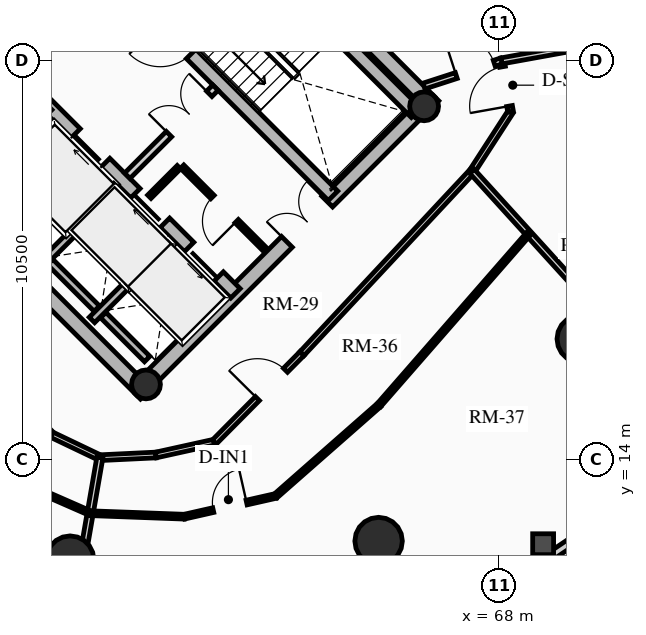
"""IFC4 building model, lengths in metres.
Left out: names, types, materials, properties, quantities, classifications, styles, units other than length and angle.
Written with IfcOpenShell. Run it as: python <this file> out.ifc"""

import sys

from ifc_helpers import new_model, si_unit, direction, frame, frame_2d, origin, origin_2d, place, context, subcontext, project, spatial, rectangle, circle, hollow_circle, extrude, source, transform, mapped, element, fill, save


model = new_model("IFC4")
c1 = context("Model", 3, precision=1e-05, world=origin(), true_north=direction((0.0, 1.0)))
c2 = subcontext(c1, "Body", "Model", "MODEL_VIEW")
j1 = project(units=[si_unit("LENGTHUNIT", "METRE"), si_unit("PLANEANGLEUNIT", "RADIAN")], contexts=[c1])
p1 = place(None, origin())
s1 = spatial("IfcSite", under=j1, at=p1, CompositionType="ELEMENT")
p2 = place(p1, origin())
s2 = spatial("IfcBuilding", under=s1, at=p2, CompositionType="ELEMENT")
p3 = place(p2, frame((0.0, 0.0, 166.15)))
s3 = spatial("IfcBuildingStorey", under=s2, at=p3, CompositionType="ELEMENT", Elevation=166.15)
for number, where, z_axis, x_axis in (
    (1, (58.702, 15.732, 0.0), (0.0, 0.0, 1.0), (-0.707, 0.707, 0.0)),
    (2, (66.268, 23.298, 0.0), (0.0, 0.0, 1.0), (-0.707, 0.707, 0.0)),
):
    element("IfcWall", number, at=place(p3, frame(where, z_axis=z_axis, x_axis=x_axis)), inside=s3, PredefinedType="SHEAR", context=c2, shape_type="SweptSolid", body=[
        extrude(rectangle(XDim=14.1, YDim=0.4, at=frame_2d((7.05, 0.0))), origin(), (0.0, 0.0, 1.0), 2.91),
    ])
p4 = place(p3, frame((58.561, 15.873, 0.0), z_axis=(0.0, 0.0, 1.0), x_axis=(0.707106781187, 0.707106781187, 0.0)))
e3 = element("IfcWall", 3, at=p4, inside=s3, PredefinedType="SHEAR", context=c2, shape_type="SweptSolid", body=[
    extrude(rectangle(XDim=10.7, YDim=0.4, at=frame_2d((5.35, 0.0))), origin(), (0.0, 0.0, 1.0), 2.91),
])
m1 = source(origin(), c2, "Body", "SweptSolid", [
    extrude(rectangle(XDim=1.5, YDim=2.02, at=frame_2d((0.75, 1.01))), frame((0.0, 0.21, 0.0), z_axis=(0.0, -1.0, 0.0), x_axis=(1.0, 0.0, 0.0)), (0.0, 0.0, 1.0), 0.42),
])
p5 = place(p4, frame((5.45, 0.0, 0.0)))
e4 = element("IfcOpeningElement", 4, at=p5, cuts=e3, PredefinedType="OPENING", context=c2, shape_type="MappedRepresentation", body=[
    mapped(m1, transform((0.0, 0.0, 0.0), x_axis=(1.0, 0.0, 0.0), y_axis=(0.0, 1.0, 0.0), z_axis=(0.0, 0.0, 1.0), scale=1.0)),
])
p6 = place(p3, frame((61.06, 18.373, 0.0), z_axis=(0.0, 0.0, 1.0), x_axis=(-0.707106781187, 0.707106781187, 0.0)))
e5 = element("IfcWall", 5, at=p6, inside=s3, PredefinedType="SHEAR", context=c2, shape_type="SweptSolid", body=[
    extrude(rectangle(XDim=13.7, YDim=0.35, at=frame_2d((6.85, 0.0))), origin(), (0.0, 0.0, 1.0), 2.91),
])
m2 = source(origin(), c2, "Body", "SweptSolid", [
    extrude(rectangle(XDim=1.1, YDim=2.015, at=frame_2d((0.55, 1.007))), frame((0.0, 0.185, 0.0), z_axis=(0.0, -1.0, 0.0), x_axis=(1.0, 0.0, 0.0)), (0.0, 0.0, 1.0), 0.37),
])
p7 = place(p6, frame((4.85, 0.0, 0.0)))
e6 = element("IfcOpeningElement", 6, at=p7, cuts=e5, PredefinedType="OPENING", context=c2, shape_type="MappedRepresentation", body=[
    mapped(m2, transform((0.0, 0.0, 0.0), x_axis=(1.0, 0.0, 0.0), y_axis=(0.0, 1.0, 0.0), z_axis=(0.0, 0.0, 1.0), scale=1.0)),
])
p8 = place(p6, frame((0.625, 0.0, 0.0)))
e7 = element("IfcOpeningElement", 7, at=p8, cuts=e5, PredefinedType="OPENING", context=c2, shape_type="MappedRepresentation", body=[
    mapped(m2, transform((0.0, 0.0, 0.0), x_axis=(1.0, 0.0, 0.0), y_axis=(0.0, 1.0, 0.0), z_axis=(0.0, 0.0, 1.0), scale=1.0)),
])
p9 = place(p6, frame((2.625, 0.0, 0.0)))
e8 = element("IfcOpeningElement", 8, at=p9, cuts=e5, PredefinedType="OPENING", context=c2, shape_type="MappedRepresentation", body=[
    mapped(m2, transform((0.0, 0.0, 0.0), x_axis=(1.0, 0.0, 0.0), y_axis=(0.0, 1.0, 0.0), z_axis=(0.0, 0.0, 1.0), scale=1.0)),
])
m3 = source(origin(), c2, "Body", "SweptSolid", [
    extrude(rectangle(XDim=1.15, YDim=2.02, at=frame_2d((0.575, 1.01))), frame((0.0, 0.185, 0.0), z_axis=(0.0, -1.0, 0.0), x_axis=(1.0, 0.0, 0.0)), (0.0, 0.0, 1.0), 0.37),
])
p10 = place(p6, frame((7.27, 0.0, 0.0)))
e9 = element("IfcOpeningElement", 9, at=p10, cuts=e5, PredefinedType="OPENING", context=c2, shape_type="MappedRepresentation", body=[
    mapped(m3, transform((0.0, 0.0, 0.0), x_axis=(1.0, 0.0, 0.0), y_axis=(0.0, 1.0, 0.0), z_axis=(0.0, 0.0, 1.0), scale=1.0)),
])
p11 = place(p3, frame((63.627, 20.94, 0.0), z_axis=(0.0, 0.0, 1.0), x_axis=(-0.707119496762, 0.707094065383, 0.0)))
e10 = element("IfcWall", 10, at=p11, inside=s3, PredefinedType="SHEAR", context=c2, shape_type="SweptSolid", body=[
    extrude(rectangle(XDim=9.6, YDim=0.35, at=frame_2d((4.8, 0.0))), origin(), (0.0, 0.0, 1.0), 2.91),
])
p12 = place(p11, frame((5.28, 0.0, 0.0)))
e11 = element("IfcOpeningElement", 11, at=p12, cuts=e10, PredefinedType="OPENING", context=c2, shape_type="MappedRepresentation", body=[
    mapped(m3, transform((0.0, 0.0, 0.0), x_axis=(1.0, 0.0, 0.0), y_axis=(0.0, 1.0, 0.0), z_axis=(0.0, 0.0, 1.0), scale=1.0)),
])
p13 = place(p3, frame((65.812, 23.125, 0.0), z_axis=(0.0, 0.0, 1.0), x_axis=(-0.707106781187, 0.707106781187, 0.0)))
e12 = element("IfcWall", 12, at=p13, inside=s3, PredefinedType="SHEAR", context=c2, shape_type="SweptSolid", body=[
    extrude(rectangle(XDim=6.695, YDim=0.35, at=frame_2d((3.348, 0.0))), origin(), (0.0, 0.0, 1.0), 2.91),
])
for number, where, z_axis, x_axis in (
    (13, (58.706, 15.976, 0.0), (0.0, 0.0, 1.0), (0.707, 0.707, 0.0)),
    (14, (66.024, 23.294, 0.0), (0.0, 0.0, 1.0), (0.707, 0.707, 0.0)),
):
    element("IfcColumn", number, at=place(p3, frame(where, z_axis=z_axis, x_axis=x_axis)), inside=s3, PredefinedType="COLUMN", context=c2, shape_type="SweptSolid", body=[
        extrude(hollow_circle(Radius=0.38, WallThickness=0.032, at=origin_2d()), origin(), (0.0, 0.0, 1.0), 2.91),
    ])
for number, where, z_axis, x_axis in (
    (15, (56.709, 11.365, 0.0), (0.0, 0.0, 1.0), (1.0, 0.0, 0.0)),
    (16, (64.827, 11.854, 0.0), (0.0, 0.0, 1.0), (1.0, 0.0, 0.0)),
    (17, (70.146, 17.173, 0.0), (0.0, 0.0, 1.0), (1.0, 0.0, 0.0)),
):
    element("IfcColumn", number, at=place(p3, frame(where, z_axis=z_axis, x_axis=x_axis)), inside=s3, PredefinedType="USERDEFINED", context=c2, shape_type="SweptSolid", body=[
        extrude(circle(Radius=0.625, at=origin_2d()), origin(), (0.0, 0.0, 1.0), 2.91),
    ])
p14 = place(p3, frame((70.065, 11.935, 0.0), z_axis=(0.0, 0.0, 1.0), x_axis=(-0.828739009952, -0.559635286042, 0.0)))
e18 = element("IfcWall", 18, at=p14, inside=s3, PredefinedType="SOLIDWALL", context=c2, shape_type="SweptSolid", body=[
    extrude(rectangle(XDim=4.569, YDim=0.22, at=frame_2d((2.284, 0.0))), origin(), (0.0, 0.0, 1.0), 2.675),
])
p15 = place(p3, frame((55.888, 19.069, 0.0), z_axis=(0.0, 0.0, 1.0), x_axis=(0.707106781187, 0.707106781187, 0.0)))
e19 = element("IfcWall", 19, at=p15, inside=s3, PredefinedType="SHEAR", context=c2, shape_type="SweptSolid", body=[
    extrude(rectangle(XDim=2.97, YDim=0.2, at=frame_2d((1.485, 0.0))), origin(), (0.0, 0.0, 1.0), 2.91),
])
p16 = place(p3, frame((57.284, 17.673, 0.0), z_axis=(0.0, 0.0, 1.0), x_axis=(0.707147878904, 0.70706568108, 0.0)))
e20 = element("IfcWall", 20, at=p16, inside=s3, PredefinedType="SHEAR", context=c2, shape_type="SweptSolid", body=[
    extrude(rectangle(XDim=2.97, YDim=0.2, at=frame_2d((1.485, 0.0))), origin(), (0.0, 0.0, 1.0), 2.91),
])
p17 = place(p3, frame((57.412, 17.97, 0.0), z_axis=(0.0, 0.0, 1.0), x_axis=(-0.707106781187, 0.707106781187, 0.0)))
e21 = element("IfcWall", 21, at=p17, inside=s3, PredefinedType="SHEAR", context=c2, shape_type="SweptSolid", body=[
    extrude(rectangle(XDim=1.735, YDim=0.2, at=frame_2d((0.867, 0.0))), origin(), (0.0, 0.0, 1.0), 2.91),
])
p18 = place(p3, frame((58.737, 16.644, 0.0), z_axis=(0.0, 0.0, 1.0), x_axis=(-0.707032117043, 0.707181437447, 0.0)))
e22 = element("IfcWall", 22, at=p18, inside=s3, PredefinedType="SHEAR", context=c2, shape_type="SweptSolid", body=[
    extrude(rectangle(XDim=1.635, YDim=0.2, at=frame_2d((0.817, 0.0))), origin(), (0.0, 0.0, 1.0), 2.91),
])
p19 = place(p3, frame((58.214, 21.467, 0.0), z_axis=(0.0, 0.0, 1.0), x_axis=(0.707106781187, 0.707106781187, 0.0)))
e23 = element("IfcWall", 23, at=p19, inside=s3, PredefinedType="PARTITIONING", context=c2, shape_type="SweptSolid", body=[
    extrude(rectangle(XDim=3.28, YDim=0.2, at=frame_2d((1.64, 0.0))), origin(), (0.0, 0.0, 1.0), 2.675),
])
m4 = source(origin(), c2, "Body", "SweptSolid", [
    extrude(rectangle(XDim=1.5, YDim=2.02, at=frame_2d((0.75, 1.01))), frame((0.0, 0.11, 0.0), z_axis=(0.0, -1.0, 0.0), x_axis=(1.0, 0.0, 0.0)), (0.0, 0.0, 1.0), 0.22),
])
p20 = place(p19, frame((1.55, 0.0, 0.0)))
e24 = element("IfcOpeningElement", 24, at=p20, cuts=e23, PredefinedType="OPENING", context=c2, shape_type="MappedRepresentation", body=[
    mapped(m4, transform((0.0, 0.0, 0.0), x_axis=(1.0, 0.0, 0.0), y_axis=(0.0, 1.0, 0.0), z_axis=(0.0, 0.0, 1.0), scale=1.0)),
])
p21 = place(p3, frame((54.961, 24.719, 0.0), z_axis=(0.0, 0.0, 1.0), x_axis=(0.707106781187, 0.707106781187, 0.0)))
e25 = element("IfcWall", 25, at=p21, inside=s3, PredefinedType="PARTITIONING", context=c2, shape_type="SweptSolid", body=[
    extrude(rectangle(XDim=3.28, YDim=0.2, at=frame_2d((1.64, 0.0))), origin(), (0.0, 0.0, 1.0), 2.675),
])
m5 = source(origin(), c2, "Body", "SweptSolid", [
    extrude(rectangle(XDim=0.9, YDim=2.005, at=frame_2d((0.45, 1.002))), frame((0.0, 0.11, 0.0), z_axis=(0.0, -1.0, 0.0), x_axis=(1.0, 0.0, 0.0)), (0.0, 0.0, 1.0), 0.22),
])
p22 = place(p21, frame((0.16, 0.0, 0.0)))
e26 = element("IfcOpeningElement", 26, at=p22, cuts=e25, PredefinedType="OPENING", context=c2, shape_type="MappedRepresentation", body=[
    mapped(m5, transform((0.0, 0.0, 0.0), x_axis=(1.0, 0.0, 0.0), y_axis=(0.0, 1.0, 0.0), z_axis=(0.0, 0.0, 1.0), scale=1.0)),
])
p23 = place(p3, frame((61.835, 19.529, 0.0), z_axis=(0.0, 0.0, 1.0), x_axis=(-0.707146413884, 0.707067146267, 0.0)))
e27 = element("IfcWall", 27, at=p23, inside=s3, PredefinedType="PARTITIONING", context=c2, shape_type="SweptSolid", body=[
    extrude(rectangle(XDim=3.08, YDim=0.125, at=frame_2d((1.54, 0.0))), origin(), (0.0, 0.0, 1.0), 2.675),
])
m6 = source(origin(), c2, "Body", "SweptSolid", [
    extrude(rectangle(XDim=0.9, YDim=2.005, at=frame_2d((0.45, 1.002))), frame((0.0, 0.073, 0.0), z_axis=(0.0, -1.0, 0.0), x_axis=(1.0, 0.0, 0.0)), (0.0, 0.0, 1.0), 0.145),
])
p24 = place(p23, frame((1.05, 0.0, 0.0)))
e28 = element("IfcOpeningElement", 28, at=p24, cuts=e27, PredefinedType="OPENING", context=c2, shape_type="MappedRepresentation", body=[
    mapped(m6, transform((0.0, 0.0, 0.0), x_axis=(1.0, 0.0, 0.0), y_axis=(0.0, 1.0, 0.0), z_axis=(0.0, 0.0, 1.0), scale=1.0)),
])
p25 = place(p3, frame((58.794, 20.915, 0.0), z_axis=(0.0, 0.0, 1.0), x_axis=(0.707106781187, 0.707106781187, 0.0)))
e29 = element("IfcWall", 29, at=p25, inside=s3, PredefinedType="PARTITIONING", context=c2, shape_type="SweptSolid", body=[
    extrude(rectangle(XDim=1.1, YDim=0.125, at=frame_2d((0.55, 0.0))), origin(), (0.0, 0.0, 1.0), 2.675),
])
p26 = place(p3, frame((51.985, 18.985, 0.0), z_axis=(0.0, 0.0, 1.0), x_axis=(0.699619654291, -0.714515457726, 0.0)))
e30 = element("IfcWall", 30, at=p26, inside=s3, PredefinedType="PARTITIONING", context=c2, shape_type="SweptSolid", body=[
    extrude(rectangle(XDim=6.064, YDim=0.15, at=frame_2d((3.032, 0.0))), origin(), (0.0, 0.0, 1.0), 2.245),
])
m7 = source(origin(), c2, "Body", "SweptSolid", [
    extrude(rectangle(XDim=1.05, YDim=2.015, at=frame_2d((0.525, 1.007))), frame((0.0, 0.085, 0.0), z_axis=(0.0, -1.0, 0.0), x_axis=(1.0, 0.0, 0.0)), (0.0, 0.0, 1.0), 0.17),
])
p27 = place(p26, frame((2.507, 0.0, 0.0)))
e31 = element("IfcOpeningElement", 31, at=p27, cuts=e30, PredefinedType="OPENING", context=c2, shape_type="MappedRepresentation", body=[
    mapped(m7, transform((0.0, 0.0, 0.0), x_axis=(1.0, 0.0, 0.0), y_axis=(0.0, 1.0, 0.0), z_axis=(0.0, 0.0, 1.0), scale=1.0)),
])
p28 = place(p3, frame((56.227, 14.652, 0.0), z_axis=(0.0, 0.0, 1.0), x_axis=(0.902364039563, -0.430974639745, 0.0)))
e32 = element("IfcWall", 32, at=p28, inside=s3, PredefinedType="PARTITIONING", context=c2, shape_type="SweptSolid", body=[
    extrude(rectangle(XDim=1.401, YDim=0.15, at=frame_2d((0.701, 0.0))), origin(), (0.0, 0.0, 1.0), 2.245),
])
p29 = place(p3, frame((57.492, 14.048, 0.0), z_axis=(0.0, 0.0, 1.0), x_axis=(0.99885011351, 0.047942160364, 0.0)))
e33 = element("IfcWall", 33, at=p29, inside=s3, PredefinedType="PARTITIONING", context=c2, shape_type="SweptSolid", body=[
    extrude(rectangle(XDim=1.477, YDim=0.15, at=frame_2d((0.738, 0.0))), origin(), (0.0, 0.0, 1.0), 2.245),
])
p30 = place(p3, frame((58.967, 14.118, 0.0), z_axis=(0.0, 0.0, 1.0), x_axis=(0.976471358036, 0.215647135235, 0.0)))
e34 = element("IfcWall", 34, at=p30, inside=s3, PredefinedType="PARTITIONING", context=c2, shape_type="SweptSolid", body=[
    extrude(rectangle(XDim=1.571, YDim=0.15, at=frame_2d((0.786, 0.0))), origin(), (0.0, 0.0, 1.0), 2.245),
])
p31 = place(p3, frame((60.501, 14.457, 0.0), z_axis=(0.0, 0.0, 1.0), x_axis=(0.704012266258, 0.710187812454, 0.0)))
e35 = element("IfcWall", 35, at=p31, inside=s3, PredefinedType="PARTITIONING", context=c2, shape_type="SweptSolid", body=[
    extrude(rectangle(XDim=3.281, YDim=0.15, at=frame_2d((1.641, 0.0))), origin(), (0.0, 0.0, 1.0), 2.245),
])
p32 = place(p31, frame((1.614, 0.0, 0.0)))
e36 = element("IfcOpeningElement", 36, at=p32, cuts=e35, PredefinedType="OPENING", context=c2, shape_type="MappedRepresentation", body=[
    mapped(m7, transform((0.0, 0.0, 0.0), x_axis=(1.0, 0.0, 0.0), y_axis=(0.0, 1.0, 0.0), z_axis=(0.0, 0.0, 1.0), scale=1.0)),
])
p33 = place(p3, frame((62.812, 16.788, 0.0), z_axis=(0.0, 0.0, 1.0), x_axis=(0.682323555485, 0.731050316757, 0.0)))
e37 = element("IfcWall", 37, at=p33, inside=s3, PredefinedType="PARTITIONING", context=c2, shape_type="SweptSolid", body=[
    extrude(rectangle(XDim=6.559, YDim=0.15, at=frame_2d((3.279, 0.0))), origin(), (0.0, 0.0, 1.0), 2.245),
])
p34 = place(p3, frame((67.287, 21.582, 0.0), z_axis=(0.0, 0.0, 1.0), x_axis=(0.543202443884, 0.839601753785, 0.0)))
e38 = element("IfcWall", 38, at=p34, inside=s3, PredefinedType="PARTITIONING", context=c2, shape_type="SweptSolid", body=[
    extrude(rectangle(XDim=1.866, YDim=0.15, at=frame_2d((0.933, 0.0))), origin(), (0.0, 0.0, 1.0), 2.245),
])
p35 = place(p3, frame((68.3, 23.149, 0.0), z_axis=(0.0, 0.0, 1.0), x_axis=(-0.176423554694, 0.984314344785, 0.0)))
e39 = element("IfcWall", 39, at=p35, inside=s3, PredefinedType="PARTITIONING", context=c2, shape_type="SweptSolid", body=[
    extrude(rectangle(XDim=1.362, YDim=0.15, at=frame_2d((0.681, 0.0))), origin(), (0.0, 0.0, 1.0), 2.245),
])
p36 = place(p35, frame((0.156, 0.0, 0.0)))
e40 = element("IfcOpeningElement", 40, at=p36, cuts=e39, PredefinedType="OPENING", context=c2, shape_type="MappedRepresentation", body=[
    mapped(m7, transform((0.0, 0.0, 0.0), x_axis=(1.0, 0.0, 0.0), y_axis=(0.0, 1.0, 0.0), z_axis=(0.0, 0.0, 1.0), scale=1.0)),
])
p37 = place(p3, frame((57.492, 14.048, 0.0), z_axis=(0.0, 0.0, 1.0), x_axis=(-0.171191349619, -0.985237799628, 0.0)))
e41 = element("IfcWall", 41, at=p37, inside=s3, PredefinedType="PARTITIONING", context=c2, shape_type="SweptSolid", body=[
    extrude(rectangle(XDim=5.295, YDim=0.16, at=frame_2d((2.647, 0.0))), origin(), (0.0, 0.0, 1.0), 2.245),
])
p38 = place(p3, frame((67.287, 21.582, 0.0), z_axis=(0.0, 0.0, 1.0), x_axis=(0.672520632772, -0.740078373212, 0.0)))
e42 = element("IfcWall", 42, at=p38, inside=s3, PredefinedType="PARTITIONING", context=c2, shape_type="SweptSolid", body=[
    extrude(rectangle(XDim=7.907, YDim=0.16, at=frame_2d((3.954, 0.0))), origin(), (0.0, 0.0, 1.0), 2.245),
])
p39 = place(p3, frame((68.06, 24.489, 0.0), z_axis=(0.0, 0.0, 1.0), x_axis=(0.983987798657, 0.178235832802, 0.0)))
e43 = element("IfcWall", 43, at=p39, inside=s3, PredefinedType="PARTITIONING", context=c2, shape_type="SweptSolid", body=[
    extrude(rectangle(XDim=5.193, YDim=0.16, at=frame_2d((2.596, 0.0))), origin(), (0.0, 0.0, 1.0), 2.245),
])
p40 = place(p3, frame((66.021, 23.828, 0.0), z_axis=(0.0, 0.0, 1.0), x_axis=(0.951292345965, 0.308290240695, 0.0)))
e44 = element("IfcWall", 44, at=p40, inside=s3, PredefinedType="PARTITIONING", context=c2, shape_type="SweptSolid", body=[
    extrude(rectangle(XDim=2.144, YDim=0.16, at=frame_2d((1.072, 0.0))), origin(), (0.0, 0.0, 1.0), 2.245),
])
m8 = source(origin(), c2, "Body", "SweptSolid", [
    extrude(rectangle(XDim=1.05, YDim=2.015, at=frame_2d((0.525, 1.007))), frame((0.0, 0.09, 0.0), z_axis=(0.0, -1.0, 0.0), x_axis=(1.0, 0.0, 0.0)), (0.0, 0.0, 1.0), 0.18),
])
p41 = place(p40, frame((0.894, 0.0, 0.0)))
e45 = element("IfcOpeningElement", 45, at=p41, cuts=e44, PredefinedType="OPENING", context=c2, shape_type="MappedRepresentation", body=[
    mapped(m8, transform((0.0, 0.0, 0.0), x_axis=(1.0, 0.0, 0.0), y_axis=(0.0, 1.0, 0.0), z_axis=(0.0, 0.0, 1.0), scale=1.0)),
])
p42 = place(p3, frame((54.94, 13.594, 0.0), z_axis=(0.0, 0.0, 1.0), x_axis=(0.915898070967, -0.401410916143, 0.0)))
e46 = element("IfcWall", 46, at=p42, inside=s3, PredefinedType="PARTITIONING", context=c2, shape_type="SweptSolid", body=[
    extrude(rectangle(XDim=2.509, YDim=0.125, at=frame_2d((1.254, 0.0))), origin(), (0.0, 0.0, 1.0), 2.245),
])
p43 = place(p3, frame((57.238, 12.587, 0.0), z_axis=(0.0, 0.0, 1.0), x_axis=(0.999316318576, -0.036971548882, 0.0)))
e47 = element("IfcWall", 47, at=p43, inside=s3, PredefinedType="PARTITIONING", context=c2, shape_type="SweptSolid", body=[
    extrude(rectangle(XDim=2.476, YDim=0.125, at=frame_2d((1.238, 0.0))), origin(), (0.0, 0.0, 1.0), 2.245),
])
p44 = place(p3, frame((59.713, 12.495, 0.0), z_axis=(0.0, 0.0, 1.0), x_axis=(0.975260144608, 0.221060286662, 0.0)))
e48 = element("IfcWall", 48, at=p44, inside=s3, PredefinedType="PARTITIONING", context=c2, shape_type="SweptSolid", body=[
    extrude(rectangle(XDim=2.465, YDim=0.125, at=frame_2d((1.232, 0.0))), origin(), (0.0, 0.0, 1.0), 2.245),
])
p45 = place(p44, frame((0.782, 0.0, 0.0)))
e49 = element("IfcOpeningElement", 49, at=p45, cuts=e48, PredefinedType="OPENING", context=c2, shape_type="MappedRepresentation", body=[
    mapped(m6, transform((0.0, 0.0, 0.0), x_axis=(1.0, 0.0, 0.0), y_axis=(0.0, 1.0, 0.0), z_axis=(0.0, 0.0, 1.0), scale=1.0)),
])
p46 = place(p3, frame((62.117, 13.04, 0.0), z_axis=(0.0, 0.0, 1.0), x_axis=(0.751084924077, 0.660205601933, 0.0)))
e50 = element("IfcWall", 50, at=p46, inside=s3, PredefinedType="PARTITIONING", context=c2, shape_type="SweptSolid", body=[
    extrude(rectangle(XDim=3.624, YDim=0.125, at=frame_2d((1.812, 0.0))), origin(), (0.0, 0.0, 1.0), 2.245),
])
p47 = place(p3, frame((64.839, 15.433, 0.0), z_axis=(0.0, 0.0, 1.0), x_axis=(0.657505208165, 0.753449999161, 0.0)))
e51 = element("IfcWall", 51, at=p47, inside=s3, PredefinedType="PARTITIONING", context=c2, shape_type="SweptSolid", body=[
    extrude(rectangle(XDim=5.988, YDim=0.125, at=frame_2d((2.994, 0.0))), origin(), (0.0, 0.0, 1.0), 2.245),
])
m9 = source(origin(), c2, "Body", "SweptSolid", [
    extrude(rectangle(XDim=1.1, YDim=2.015, at=frame_2d((0.55, 1.007))), frame((0.0, 0.025, 0.0), z_axis=(0.0, -1.0, 0.0), x_axis=(1.0, 0.0, 0.0)), (0.0, 0.0, 1.0), 0.05),
])
p48 = place(p7, origin())
e52 = element("IfcDoor", 52, at=p48, inside=s3, OperationType="SLIDING_TO_RIGHT", PredefinedType="DOOR", context=c2, shape_type="MappedRepresentation", body=[
    mapped(m9, transform((0.0, 0.0, 0.0), x_axis=(1.0, 0.0, 0.0), y_axis=(0.0, 1.0, 0.0), z_axis=(0.0, 0.0, 1.0), scale=1.0)),
])
fill(e6, e52)
p49 = place(p8, origin())
e53 = element("IfcDoor", 53, at=p49, inside=s3, OperationType="SLIDING_TO_LEFT", PredefinedType="DOOR", context=c2, shape_type="MappedRepresentation", body=[
    mapped(m9, transform((0.0, 0.0, 0.0), x_axis=(1.0, 0.0, 0.0), y_axis=(0.0, 1.0, 0.0), z_axis=(0.0, 0.0, 1.0), scale=1.0)),
])
fill(e7, e53)
p50 = place(p9, origin())
e54 = element("IfcDoor", 54, at=p50, inside=s3, OperationType="SLIDING_TO_RIGHT", PredefinedType="DOOR", context=c2, shape_type="MappedRepresentation", body=[
    mapped(m9, transform((0.0, 0.0, 0.0), x_axis=(1.0, 0.0, 0.0), y_axis=(0.0, 1.0, 0.0), z_axis=(0.0, 0.0, 1.0), scale=1.0)),
])
fill(e8, e54)
m10 = source(origin(), c2, "Body", "SweptSolid", [
    extrude(rectangle(XDim=1.15, YDim=2.02, at=frame_2d((0.575, 1.01))), frame((0.0, 0.025, 0.0), z_axis=(0.0, -1.0, 0.0), x_axis=(1.0, 0.0, 0.0)), (0.0, 0.0, 1.0), 0.05),
])
p51 = place(p12, origin())
e55 = element("IfcDoor", 55, at=p51, inside=s3, OperationType="SINGLE_SWING_RIGHT", PredefinedType="DOOR", context=c2, shape_type="MappedRepresentation", body=[
    mapped(m10, transform((0.0, 0.0, 0.0), x_axis=(1.0, 0.0, 0.0), y_axis=(0.0, 1.0, 0.0), z_axis=(0.0, 0.0, 1.0), scale=1.0)),
])
fill(e11, e55)
m11 = source(origin(), c2, "Body", "SweptSolid", [
    extrude(rectangle(XDim=1.5, YDim=2.02, at=frame_2d((0.75, 1.01))), frame((0.0, 0.025, 0.0), z_axis=(0.0, -1.0, 0.0), x_axis=(1.0, 0.0, 0.0)), (0.0, 0.0, 1.0), 0.05),
])
p52 = place(p5, origin())
e56 = element("IfcDoor", 56, at=p52, inside=s3, OperationType="DOUBLE_DOOR_SINGLE_SWING", PredefinedType="DOOR", context=c2, shape_type="MappedRepresentation", body=[
    mapped(m11, transform((0.0, 0.0, 0.0), x_axis=(1.0, 0.0, 0.0), y_axis=(0.0, 1.0, 0.0), z_axis=(0.0, 0.0, 1.0), scale=1.0)),
])
fill(e4, e56)
p53 = place(p20, origin())
e57 = element("IfcDoor", 57, at=p53, inside=s3, OperationType="DOUBLE_DOOR_SINGLE_SWING", PredefinedType="DOOR", context=c2, shape_type="MappedRepresentation", body=[
    mapped(m11, transform((0.0, 0.0, 0.0), x_axis=(1.0, 0.0, 0.0), y_axis=(0.0, 1.0, 0.0), z_axis=(0.0, 0.0, 1.0), scale=1.0)),
])
fill(e24, e57)
m12 = source(origin(), c2, "Body", "SweptSolid", [
    extrude(rectangle(XDim=0.9, YDim=2.005, at=frame_2d((0.45, 1.002))), frame((0.0, 0.025, 0.0), z_axis=(0.0, -1.0, 0.0), x_axis=(1.0, 0.0, 0.0)), (0.0, 0.0, 1.0), 0.05),
])
p54 = place(p24, origin())
e58 = element("IfcDoor", 58, at=p54, inside=s3, OperationType="SINGLE_SWING_LEFT", PredefinedType="DOOR", context=c2, shape_type="MappedRepresentation", body=[
    mapped(m12, transform((0.0, 0.0, 0.0), x_axis=(1.0, 0.0, 0.0), y_axis=(0.0, 1.0, 0.0), z_axis=(0.0, 0.0, 1.0), scale=1.0)),
])
fill(e28, e58)
m13 = source(origin(), c2, "Body", "SweptSolid", [
    extrude(rectangle(XDim=1.05, YDim=2.015, at=frame_2d((0.525, 1.007))), frame((0.0, 0.025, 0.0), z_axis=(0.0, -1.0, 0.0), x_axis=(1.0, 0.0, 0.0)), (0.0, 0.0, 1.0), 0.05),
])
p55 = place(p41, origin())
e59 = element("IfcDoor", 59, at=p55, inside=s3, OperationType="SINGLE_SWING_LEFT", PredefinedType="DOOR", context=c2, shape_type="MappedRepresentation", body=[
    mapped(m13, transform((0.0, 0.0, 0.0), x_axis=(1.0, 0.0, 0.0), y_axis=(0.0, 1.0, 0.0), z_axis=(0.0, 0.0, 1.0), scale=1.0)),
])
fill(e45, e59)
p56 = place(p32, origin())
e60 = element("IfcDoor", 60, at=p56, inside=s3, OperationType="SINGLE_SWING_LEFT", PredefinedType="DOOR", context=c2, shape_type="MappedRepresentation", body=[
    mapped(m13, transform((0.0, 0.0, 0.0), x_axis=(1.0, 0.0, 0.0), y_axis=(0.0, 1.0, 0.0), z_axis=(0.0, 0.0, 1.0), scale=1.0)),
])
fill(e36, e60)
p57 = place(p45, origin())
e61 = element("IfcDoor", 61, at=p57, inside=s3, OperationType="SINGLE_SWING_RIGHT", PredefinedType="DOOR", context=c2, shape_type="MappedRepresentation", body=[
    mapped(m12, transform((0.0, 0.0, 0.0), x_axis=(1.0, 0.0, 0.0), y_axis=(0.0, 1.0, 0.0), z_axis=(0.0, 0.0, 1.0), scale=1.0)),
])
fill(e49, e61)
p58 = place(p36, origin())
e62 = element("IfcDoor", 62, at=p58, inside=s3, OperationType="SINGLE_SWING_LEFT", PredefinedType="DOOR", context=c2, shape_type="MappedRepresentation", body=[
    mapped(m13, transform((0.0, 0.0, 0.0), x_axis=(1.0, 0.0, 0.0), y_axis=(0.0, 1.0, 0.0), z_axis=(0.0, 0.0, 1.0), scale=1.0)),
])
fill(e40, e62)
save(model, sys.argv[1])
